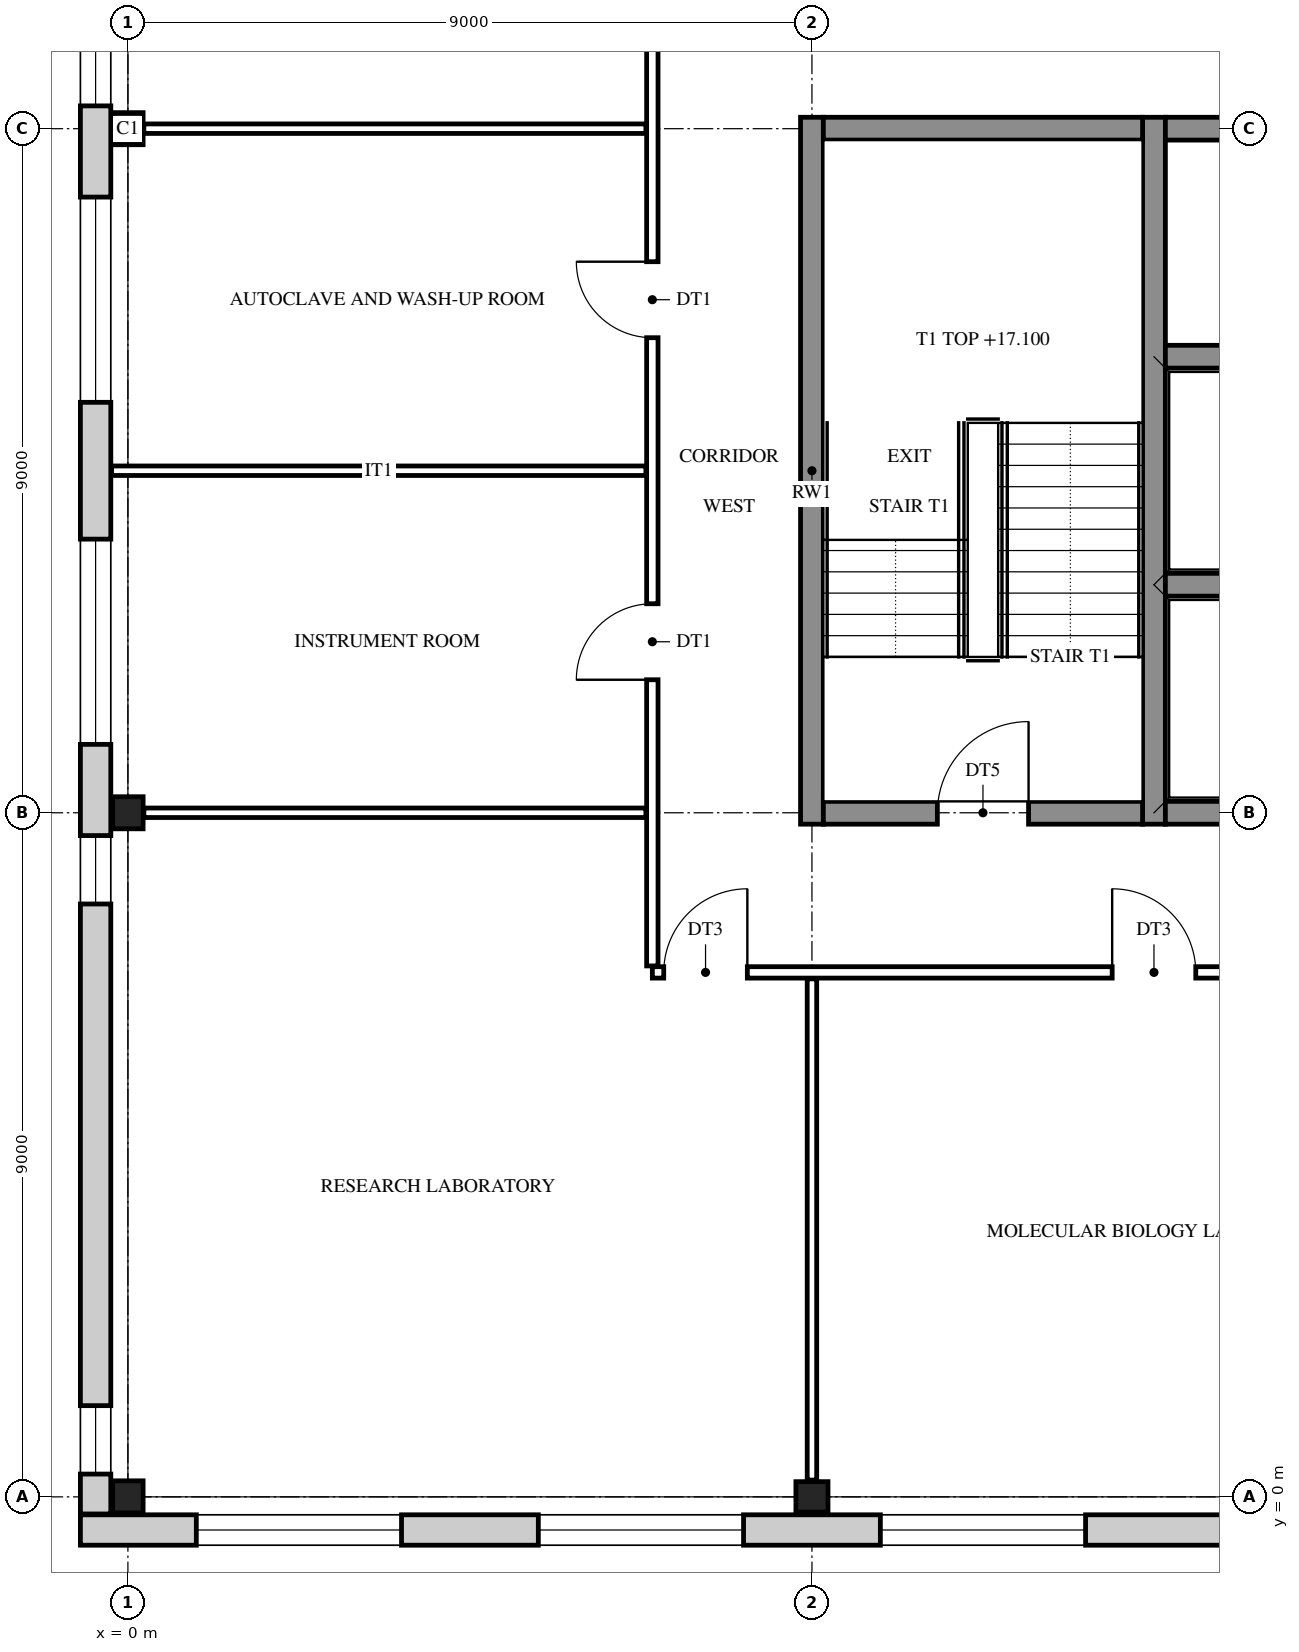
"""IFC4 building model, lengths in metres.
Left out: names, types, materials, properties, quantities, classifications, styles, units other than length and angle.
Written with IfcOpenShell. Run it as: python <this file> out.ifc"""

import sys

from ifc_helpers import new_model, si_unit, direction, frame, frame_2d, origin, origin_2d, place, context, subcontext, project, spatial, rectangle, i_section, extrude, element, fill, save


model = new_model("IFC4")
c1 = context("Model", 3, precision=1e-05, world=origin(), true_north=direction((0.0, 1.0)))
c2 = subcontext(c1, "Body", "Model", "MODEL_VIEW")
j1 = project(units=[si_unit("LENGTHUNIT", "METRE"), si_unit("PLANEANGLEUNIT", "RADIAN")], contexts=[c1])
p1 = place(None, origin())
s1 = spatial("IfcSite", under=j1, at=p1, CompositionType="ELEMENT")
p2 = place(p1, origin())
s2 = spatial("IfcBuilding", under=s1, at=p2, CompositionType="ELEMENT")
p3 = place(p2, frame((0.0, 0.0, 15.0)))
s3 = spatial("IfcBuildingStorey", under=s2, at=p3, CompositionType="ELEMENT", Elevation=15.0)
for number, where, z_axis, x_axis in (
    (1, (0.0, 0.0, 0.0), (0.0, 0.0, 1.0), (1.0, 0.0, 0.0)),
    (2, (0.0, 9.0, 0.0), (0.0, 0.0, 1.0), (1.0, 0.0, 0.0)),
    (3, (0.0, 18.0, 0.0), (0.0, 0.0, 1.0), (1.0, 0.0, 0.0)),
    (4, (9.0, 0.0, 0.0), (0.0, 0.0, 1.0), (0.0, 1.0, 0.0)),
):
    element("IfcColumn", number, at=place(p3, frame(where, z_axis=z_axis, x_axis=x_axis)), inside=s3, PredefinedType="COLUMN", context=c2, shape_type="SweptSolid", body=[
        extrude(i_section(OverallWidth=0.4, OverallDepth=0.422, WebThickness=0.028, FlangeThickness=0.036, at=origin_2d()), origin(), (0.0, 0.0, 1.0), 4.2),
    ])
for number, where, z_axis, x_axis in (
    (5, (9.0, 8.85, 0.0), (0.0, 0.0, 1.0), (0.0, 1.0, 0.0)),
    (6, (13.5, 8.85, 0.0), (0.0, 0.0, 1.0), (0.0, 1.0, 0.0)),
):
    element("IfcWall", number, at=place(p3, frame(where, z_axis=z_axis, x_axis=x_axis)), inside=s3, PredefinedType="SHEAR", context=c2, shape_type="SweptSolid", body=[
        extrude(rectangle(XDim=9.3, YDim=0.3, at=frame_2d((4.65, 0.0))), origin(), (0.0, 0.0, 1.0), 4.2),
    ])
p4 = place(p3, frame((9.15, 9.0, 0.0), z_axis=(0.0, 0.0, 1.0), x_axis=(1.0, 0.0, 0.0)))
e7 = element("IfcWall", 7, at=p4, inside=s3, PredefinedType="SHEAR", context=c2, shape_type="SweptSolid", body=[
    extrude(rectangle(XDim=4.2, YDim=0.3, at=frame_2d((2.1, 0.0))), origin(), (0.0, 0.0, 1.0), 4.2),
])
p5 = place(p4, frame((1.5, 0.0, 0.0)))
e8 = element("IfcOpeningElement", 8, at=p5, cuts=e7, PredefinedType="OPENING", context=c2, shape_type="SweptSolid", body=[
    extrude(rectangle(XDim=1.2, YDim=2.1, at=frame_2d((0.6, 1.05))), frame((0.0, 0.16, 0.0), z_axis=(0.0, -1.0, 0.0), x_axis=(1.0, 0.0, 0.0)), (0.0, 0.0, 1.0), 0.32),
])
for number, where, z_axis, x_axis in (
    (9, (13.65, 9.0, 0.0), (0.0, 0.0, 1.0), (1.0, 0.0, 0.0)),
    (10, (13.65, 12.0, 0.0), (0.0, 0.0, 1.0), (1.0, 0.0, 0.0)),
    (11, (13.65, 15.0, 0.0), (0.0, 0.0, 1.0), (1.0, 0.0, 0.0)),
):
    element("IfcWall", number, at=place(p3, frame(where, z_axis=z_axis, x_axis=x_axis)), inside=s3, PredefinedType="SHEAR", context=c2, shape_type="SweptSolid", body=[
        extrude(rectangle(XDim=2.7, YDim=0.3, at=frame_2d((1.35, 0.0))), origin(), (0.0, 0.0, 1.0), 4.2),
    ])
p6 = place(p3, frame((9.15, 18.0, 0.0), z_axis=(0.0, 0.0, 1.0), x_axis=(1.0, 0.0, 0.0)))
e12 = element("IfcWall", 12, at=p6, inside=s3, PredefinedType="SHEAR", context=c2, shape_type="SweptSolid", body=[
    extrude(rectangle(XDim=4.2, YDim=0.3, at=frame_2d((2.1, 0.0))), origin(), (0.0, 0.0, 1.0), 4.2),
])
p7 = place(p3, frame((13.65, 18.0, 0.0), z_axis=(0.0, 0.0, 1.0), x_axis=(1.0, 0.0, 0.0)))
e13 = element("IfcWall", 13, at=p7, inside=s3, PredefinedType="SHEAR", context=c2, shape_type="SweptSolid", body=[
    extrude(rectangle(XDim=2.7, YDim=0.3, at=frame_2d((1.35, 0.0))), origin(), (0.0, 0.0, 1.0), 4.2),
])
p8 = place(p3, frame((32.125, -0.436, 0.0), z_axis=(0.0, 0.0, 1.0), x_axis=(-1.0, 0.0, 0.0)))
e14 = element("IfcWall", 14, at=p8, inside=s3, PredefinedType="STANDARD", context=c2, shape_type="SweptSolid", body=[
    extrude(rectangle(XDim=32.75, YDim=0.4, at=frame_2d((16.375, 0.0))), origin(), (0.0, 0.0, 1.0), 4.2),
])
p9 = place(p8, frame((28.525, 0.0, 0.9)))
e15 = element("IfcOpeningElement", 15, at=p9, cuts=e14, PredefinedType="OPENING", context=c2, shape_type="SweptSolid", body=[
    extrude(rectangle(XDim=2.7, YDim=2.5, at=frame_2d((1.35, 1.25))), frame((0.0, 0.21, 0.0), z_axis=(0.0, -1.0, 0.0), x_axis=(1.0, 0.0, 0.0)), (0.0, 0.0, 1.0), 0.42),
])
p10 = place(p8, frame((24.025, 0.0, 0.9)))
e16 = element("IfcOpeningElement", 16, at=p10, cuts=e14, PredefinedType="OPENING", context=c2, shape_type="SweptSolid", body=[
    extrude(rectangle(XDim=2.7, YDim=2.5, at=frame_2d((1.35, 1.25))), frame((0.0, 0.21, 0.0), z_axis=(0.0, -1.0, 0.0), x_axis=(1.0, 0.0, 0.0)), (0.0, 0.0, 1.0), 0.42),
])
p11 = place(p8, frame((19.525, 0.0, 0.9)))
e17 = element("IfcOpeningElement", 17, at=p11, cuts=e14, PredefinedType="OPENING", context=c2, shape_type="SweptSolid", body=[
    extrude(rectangle(XDim=2.7, YDim=2.5, at=frame_2d((1.35, 1.25))), frame((0.0, 0.21, 0.0), z_axis=(0.0, -1.0, 0.0), x_axis=(1.0, 0.0, 0.0)), (0.0, 0.0, 1.0), 0.42),
])
p12 = place(p8, frame((15.025, 0.0, 0.9)))
e18 = element("IfcOpeningElement", 18, at=p12, cuts=e14, PredefinedType="OPENING", context=c2, shape_type="SweptSolid", body=[
    extrude(rectangle(XDim=2.7, YDim=2.5, at=frame_2d((1.35, 1.25))), frame((0.0, 0.21, 0.0), z_axis=(0.0, -1.0, 0.0), x_axis=(1.0, 0.0, 0.0)), (0.0, 0.0, 1.0), 0.42),
])
p13 = place(p8, frame((10.525, 0.0, 0.9)))
e19 = element("IfcOpeningElement", 19, at=p13, cuts=e14, PredefinedType="OPENING", context=c2, shape_type="SweptSolid", body=[
    extrude(rectangle(XDim=2.7, YDim=2.5, at=frame_2d((1.35, 1.25))), frame((0.0, 0.21, 0.0), z_axis=(0.0, -1.0, 0.0), x_axis=(1.0, 0.0, 0.0)), (0.0, 0.0, 1.0), 0.42),
])
p14 = place(p8, frame((6.025, 0.0, 0.9)))
e20 = element("IfcOpeningElement", 20, at=p14, cuts=e14, PredefinedType="OPENING", context=c2, shape_type="SweptSolid", body=[
    extrude(rectangle(XDim=2.7, YDim=2.5, at=frame_2d((1.35, 1.25))), frame((0.0, 0.21, 0.0), z_axis=(0.0, -1.0, 0.0), x_axis=(1.0, 0.0, 0.0)), (0.0, 0.0, 1.0), 0.42),
])
p15 = place(p8, frame((1.525, 0.0, 0.9)))
e21 = element("IfcOpeningElement", 21, at=p15, cuts=e14, PredefinedType="OPENING", context=c2, shape_type="SweptSolid", body=[
    extrude(rectangle(XDim=2.7, YDim=2.5, at=frame_2d((1.35, 1.25))), frame((0.0, 0.21, 0.0), z_axis=(0.0, -1.0, 0.0), x_axis=(1.0, 0.0, 0.0)), (0.0, 0.0, 1.0), 0.42),
])
p16 = place(p3, frame((-0.425, -0.225, 0.0), z_axis=(0.0, 0.0, 1.0), x_axis=(0.0, 1.0, 0.0)))
e22 = element("IfcWall", 22, at=p16, inside=s3, PredefinedType="STANDARD", context=c2, shape_type="SweptSolid", body=[
    extrude(rectangle(XDim=27.45, YDim=0.4, at=frame_2d((13.725, 0.0))), origin(), (0.0, 0.0, 1.0), 4.2),
])
p17 = place(p16, frame((0.525, 0.0, 0.9)))
e23 = element("IfcOpeningElement", 23, at=p17, cuts=e22, PredefinedType="OPENING", context=c2, shape_type="SweptSolid", body=[
    extrude(rectangle(XDim=0.9, YDim=2.0, at=frame_2d((0.45, 1.0))), frame((0.0, 0.21, 0.0), z_axis=(0.0, -1.0, 0.0), x_axis=(1.0, 0.0, 0.0)), (0.0, 0.0, 1.0), 0.42),
])
p18 = place(p16, frame((8.025, 0.0, 0.9)))
e24 = element("IfcOpeningElement", 24, at=p18, cuts=e22, PredefinedType="OPENING", context=c2, shape_type="SweptSolid", body=[
    extrude(rectangle(XDim=0.9, YDim=2.0, at=frame_2d((0.45, 1.0))), frame((0.0, 0.21, 0.0), z_axis=(0.0, -1.0, 0.0), x_axis=(1.0, 0.0, 0.0)), (0.0, 0.0, 1.0), 0.42),
])
p19 = place(p16, frame((10.125, 0.0, 0.9)))
e25 = element("IfcOpeningElement", 25, at=p19, cuts=e22, PredefinedType="OPENING", context=c2, shape_type="SweptSolid", body=[
    extrude(rectangle(XDim=2.7, YDim=2.5, at=frame_2d((1.35, 1.25))), frame((0.0, 0.21, 0.0), z_axis=(0.0, -1.0, 0.0), x_axis=(1.0, 0.0, 0.0)), (0.0, 0.0, 1.0), 0.42),
])
p20 = place(p16, frame((14.625, 0.0, 0.9)))
e26 = element("IfcOpeningElement", 26, at=p20, cuts=e22, PredefinedType="OPENING", context=c2, shape_type="SweptSolid", body=[
    extrude(rectangle(XDim=2.7, YDim=2.5, at=frame_2d((1.35, 1.25))), frame((0.0, 0.21, 0.0), z_axis=(0.0, -1.0, 0.0), x_axis=(1.0, 0.0, 0.0)), (0.0, 0.0, 1.0), 0.42),
])
p21 = place(p16, frame((18.525, 0.0, 0.9)))
e27 = element("IfcOpeningElement", 27, at=p21, cuts=e22, PredefinedType="OPENING", context=c2, shape_type="SweptSolid", body=[
    extrude(rectangle(XDim=0.9, YDim=2.0, at=frame_2d((0.45, 1.0))), frame((0.0, 0.21, 0.0), z_axis=(0.0, -1.0, 0.0), x_axis=(1.0, 0.0, 0.0)), (0.0, 0.0, 1.0), 0.42),
])
p22 = place(p16, frame((26.025, 0.0, 0.9)))
e28 = element("IfcOpeningElement", 28, at=p22, cuts=e22, PredefinedType="OPENING", context=c2, shape_type="SweptSolid", body=[
    extrude(rectangle(XDim=0.9, YDim=2.0, at=frame_2d((0.45, 1.0))), frame((0.0, 0.21, 0.0), z_axis=(0.0, -1.0, 0.0), x_axis=(1.0, 0.0, 0.0)), (0.0, 0.0, 1.0), 0.42),
])
p23 = place(p3, frame((6.9, 6.985, 0.0), z_axis=(0.0, 0.0, 1.0), x_axis=(0.0, 1.0, 0.0)))
e29 = element("IfcWall", 29, at=p23, inside=s3, PredefinedType="PARTITIONING", context=c2, shape_type="SweptSolid", body=[
    extrude(rectangle(XDim=13.03, YDim=0.15, at=frame_2d((6.515, 0.0))), origin(), (0.0, 0.0, 1.0), 3.537),
])
p24 = place(p23, frame((3.765, 0.0, 0.0)))
e30 = element("IfcOpeningElement", 30, at=p24, cuts=e29, PredefinedType="OPENING", context=c2, shape_type="SweptSolid", body=[
    extrude(rectangle(XDim=1.0, YDim=2.1, at=frame_2d((0.5, 1.05))), frame((0.0, 0.085, 0.0), z_axis=(0.0, -1.0, 0.0), x_axis=(1.0, 0.0, 0.0)), (0.0, 0.0, 1.0), 0.17),
])
p25 = place(p23, frame((8.265, 0.0, 0.0)))
e31 = element("IfcOpeningElement", 31, at=p25, cuts=e29, PredefinedType="OPENING", context=c2, shape_type="SweptSolid", body=[
    extrude(rectangle(XDim=1.0, YDim=2.1, at=frame_2d((0.5, 1.05))), frame((0.0, 0.085, 0.0), z_axis=(0.0, -1.0, 0.0), x_axis=(1.0, 0.0, 0.0)), (0.0, 0.0, 1.0), 0.17),
])
p26 = place(p3, frame((9.0, 0.221, 0.0), z_axis=(0.0, 0.0, 1.0), x_axis=(0.0, 1.0, 0.0)))
e32 = element("IfcWall", 32, at=p26, inside=s3, PredefinedType="PARTITIONING", context=c2, shape_type="SweptSolid", body=[
    extrude(rectangle(XDim=6.594, YDim=0.125, at=frame_2d((3.297, 0.0))), origin(), (0.0, 0.0, 1.0), 3.537),
])
p27 = place(p3, frame((6.9, 6.9, 0.0), z_axis=(0.0, 0.0, 1.0), x_axis=(1.0, 0.0, 0.0)))
e33 = element("IfcWall", 33, at=p27, inside=s3, PredefinedType="PARTITIONING", context=c2, shape_type="SweptSolid", body=[
    extrude(rectangle(XDim=20.1, YDim=0.15, at=frame_2d((10.05, 0.0))), origin(), (0.0, 0.0, 1.0), 3.537),
])
p28 = place(p27, frame((0.15, 0.0, 0.0)))
e34 = element("IfcOpeningElement", 34, at=p28, cuts=e33, PredefinedType="OPENING", context=c2, shape_type="SweptSolid", body=[
    extrude(rectangle(XDim=1.1, YDim=2.1, at=frame_2d((0.55, 1.05))), frame((0.0, 0.085, 0.0), z_axis=(0.0, -1.0, 0.0), x_axis=(1.0, 0.0, 0.0)), (0.0, 0.0, 1.0), 0.17),
])
p29 = place(p27, frame((6.05, 0.0, 0.0)))
e35 = element("IfcOpeningElement", 35, at=p29, cuts=e33, PredefinedType="OPENING", context=c2, shape_type="SweptSolid", body=[
    extrude(rectangle(XDim=1.1, YDim=2.1, at=frame_2d((0.55, 1.05))), frame((0.0, 0.085, 0.0), z_axis=(0.0, -1.0, 0.0), x_axis=(1.0, 0.0, 0.0)), (0.0, 0.0, 1.0), 0.17),
])
p30 = place(p27, frame((16.25, 0.0, 0.0)))
e36 = element("IfcOpeningElement", 36, at=p30, cuts=e33, PredefinedType="OPENING", context=c2, shape_type="SweptSolid", body=[
    extrude(rectangle(XDim=1.1, YDim=2.1, at=frame_2d((0.55, 1.05))), frame((0.0, 0.085, 0.0), z_axis=(0.0, -1.0, 0.0), x_axis=(1.0, 0.0, 0.0)), (0.0, 0.0, 1.0), 0.17),
])
p31 = place(p3, frame((0.21, 9.0, 0.0), z_axis=(0.0, 0.0, 1.0), x_axis=(1.0, 0.0, 0.0)))
e37 = element("IfcWall", 37, at=p31, inside=s3, PredefinedType="PARTITIONING", context=c2, shape_type="SweptSolid", body=[
    extrude(rectangle(XDim=6.605, YDim=0.125, at=frame_2d((3.302, 0.0))), origin(), (0.0, 0.0, 1.0), 3.537),
])
p32 = place(p3, frame((-0.215, 13.5, 0.0), z_axis=(0.0, 0.0, 1.0), x_axis=(1.0, 0.0, 0.0)))
e38 = element("IfcWall", 38, at=p32, inside=s3, PredefinedType="PARTITIONING", context=c2, shape_type="SweptSolid", body=[
    extrude(rectangle(XDim=7.03, YDim=0.125, at=frame_2d((3.515, 0.0))), origin(), (0.0, 0.0, 1.0), 3.537),
])
p33 = place(p3, frame((0.21, 18.0, 0.0), z_axis=(0.0, 0.0, 1.0), x_axis=(1.0, 0.0, 0.0)))
e39 = element("IfcWall", 39, at=p33, inside=s3, PredefinedType="PARTITIONING", context=c2, shape_type="SweptSolid", body=[
    extrude(rectangle(XDim=6.605, YDim=0.125, at=frame_2d((3.302, 0.0))), origin(), (0.0, 0.0, 1.0), 3.537),
])
p34 = place(p9, origin())
e40 = element("IfcWindow", 40, at=p34, inside=s3, PartitioningType="SINGLE_PANEL", PredefinedType="WINDOW", context=c2, shape_type="SweptSolid", body=[
    extrude(rectangle(XDim=2.7, YDim=2.5, at=frame_2d((1.35, 1.25))), frame((0.0, 0.03, 0.0), z_axis=(0.0, -1.0, 0.0), x_axis=(1.0, 0.0, 0.0)), (0.0, 0.0, 1.0), 0.06),
])
fill(e15, e40)
p35 = place(p10, origin())
e41 = element("IfcWindow", 41, at=p35, inside=s3, PartitioningType="SINGLE_PANEL", PredefinedType="WINDOW", context=c2, shape_type="SweptSolid", body=[
    extrude(rectangle(XDim=2.7, YDim=2.5, at=frame_2d((1.35, 1.25))), frame((0.0, 0.03, 0.0), z_axis=(0.0, -1.0, 0.0), x_axis=(1.0, 0.0, 0.0)), (0.0, 0.0, 1.0), 0.06),
])
fill(e16, e41)
p36 = place(p11, origin())
e42 = element("IfcWindow", 42, at=p36, inside=s3, PartitioningType="SINGLE_PANEL", PredefinedType="WINDOW", context=c2, shape_type="SweptSolid", body=[
    extrude(rectangle(XDim=2.7, YDim=2.5, at=frame_2d((1.35, 1.25))), frame((0.0, 0.03, 0.0), z_axis=(0.0, -1.0, 0.0), x_axis=(1.0, 0.0, 0.0)), (0.0, 0.0, 1.0), 0.06),
])
fill(e17, e42)
p37 = place(p17, origin())
e43 = element("IfcWindow", 43, at=p37, inside=s3, PartitioningType="SINGLE_PANEL", PredefinedType="WINDOW", context=c2, shape_type="SweptSolid", body=[
    extrude(rectangle(XDim=0.9, YDim=2.0, at=frame_2d((0.45, 1.0))), frame((0.0, 0.03, 0.0), z_axis=(0.0, -1.0, 0.0), x_axis=(1.0, 0.0, 0.0)), (0.0, 0.0, 1.0), 0.06),
])
fill(e23, e43)
p38 = place(p18, origin())
e44 = element("IfcWindow", 44, at=p38, inside=s3, PartitioningType="SINGLE_PANEL", PredefinedType="WINDOW", context=c2, shape_type="SweptSolid", body=[
    extrude(rectangle(XDim=0.9, YDim=2.0, at=frame_2d((0.45, 1.0))), frame((0.0, 0.03, 0.0), z_axis=(0.0, -1.0, 0.0), x_axis=(1.0, 0.0, 0.0)), (0.0, 0.0, 1.0), 0.06),
])
fill(e24, e44)
p39 = place(p19, origin())
e45 = element("IfcWindow", 45, at=p39, inside=s3, PartitioningType="SINGLE_PANEL", PredefinedType="WINDOW", context=c2, shape_type="SweptSolid", body=[
    extrude(rectangle(XDim=2.7, YDim=2.5, at=frame_2d((1.35, 1.25))), frame((0.0, 0.03, 0.0), z_axis=(0.0, -1.0, 0.0), x_axis=(1.0, 0.0, 0.0)), (0.0, 0.0, 1.0), 0.06),
])
fill(e25, e45)
p40 = place(p20, origin())
e46 = element("IfcWindow", 46, at=p40, inside=s3, PartitioningType="SINGLE_PANEL", PredefinedType="WINDOW", context=c2, shape_type="SweptSolid", body=[
    extrude(rectangle(XDim=2.7, YDim=2.5, at=frame_2d((1.35, 1.25))), frame((0.0, 0.03, 0.0), z_axis=(0.0, -1.0, 0.0), x_axis=(1.0, 0.0, 0.0)), (0.0, 0.0, 1.0), 0.06),
])
fill(e26, e46)
p41 = place(p21, origin())
e47 = element("IfcWindow", 47, at=p41, inside=s3, PartitioningType="SINGLE_PANEL", PredefinedType="WINDOW", context=c2, shape_type="SweptSolid", body=[
    extrude(rectangle(XDim=0.9, YDim=2.0, at=frame_2d((0.45, 1.0))), frame((0.0, 0.03, 0.0), z_axis=(0.0, -1.0, 0.0), x_axis=(1.0, 0.0, 0.0)), (0.0, 0.0, 1.0), 0.06),
])
fill(e27, e47)
p42 = place(p5, origin())
e48 = element("IfcDoor", 48, at=p42, inside=s3, OperationType="SINGLE_SWING_RIGHT", PredefinedType="DOOR", context=c2, shape_type="SweptSolid", body=[
    extrude(rectangle(XDim=1.2, YDim=2.1, at=frame_2d((0.6, 1.05))), frame((0.0, 0.025, 0.0), z_axis=(0.0, -1.0, 0.0), x_axis=(1.0, 0.0, 0.0)), (0.0, 0.0, 1.0), 0.05),
])
fill(e8, e48)
p43 = place(p28, frame((1.1, 0.0, 0.0), z_axis=(0.0, 0.0, 1.0), x_axis=(-1.0, 0.0, 0.0)))
e49 = element("IfcDoor", 49, at=p43, inside=s3, OperationType="SINGLE_SWING_RIGHT", PredefinedType="DOOR", context=c2, shape_type="SweptSolid", body=[
    extrude(rectangle(XDim=1.1, YDim=2.1, at=frame_2d((0.55, 1.05))), frame((0.0, 0.025, 0.0), z_axis=(0.0, -1.0, 0.0), x_axis=(1.0, 0.0, 0.0)), (0.0, 0.0, 1.0), 0.05),
])
fill(e34, e49)
p44 = place(p29, frame((1.1, 0.0, 0.0), z_axis=(0.0, 0.0, 1.0), x_axis=(-1.0, 0.0, 0.0)))
e50 = element("IfcDoor", 50, at=p44, inside=s3, OperationType="SINGLE_SWING_LEFT", PredefinedType="DOOR", context=c2, shape_type="SweptSolid", body=[
    extrude(rectangle(XDim=1.1, YDim=2.1, at=frame_2d((0.55, 1.05))), frame((0.0, 0.025, 0.0), z_axis=(0.0, -1.0, 0.0), x_axis=(1.0, 0.0, 0.0)), (0.0, 0.0, 1.0), 0.05),
])
fill(e35, e50)
p45 = place(p24, origin())
e51 = element("IfcDoor", 51, at=p45, inside=s3, OperationType="SINGLE_SWING_LEFT", PredefinedType="DOOR", context=c2, shape_type="SweptSolid", body=[
    extrude(rectangle(XDim=1.0, YDim=2.1, at=frame_2d((0.5, 1.05))), frame((0.0, 0.025, 0.0), z_axis=(0.0, -1.0, 0.0), x_axis=(1.0, 0.0, 0.0)), (0.0, 0.0, 1.0), 0.05),
])
fill(e30, e51)
p46 = place(p25, origin())
e52 = element("IfcDoor", 52, at=p46, inside=s3, OperationType="SINGLE_SWING_RIGHT", PredefinedType="DOOR", context=c2, shape_type="SweptSolid", body=[
    extrude(rectangle(XDim=1.0, YDim=2.1, at=frame_2d((0.5, 1.05))), frame((0.0, 0.025, 0.0), z_axis=(0.0, -1.0, 0.0), x_axis=(1.0, 0.0, 0.0)), (0.0, 0.0, 1.0), 0.05),
])
fill(e31, e52)
save(model, sys.argv[1])
